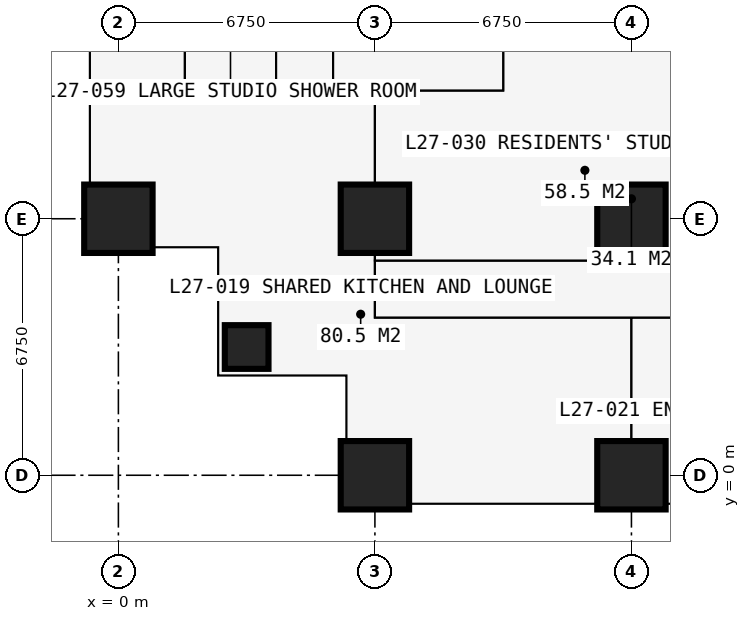
"""IFC4 building model, lengths in metres.
Left out: names, types, materials, properties, quantities, classifications, styles, units other than length and angle.
Written with IfcOpenShell. Run it as: python <this file> out.ifc"""

import sys

from ifc_helpers import new_model, si_unit, direction, frame, frame_2d, origin, origin_2d, place, context, subcontext, project, spatial, rectangle, extrude, element, fill, save


model = new_model("IFC4")
c1 = context("Model", 3, precision=1e-05, world=origin(), true_north=direction((0.0, 1.0)))
c2 = subcontext(c1, "Body", "Model", "MODEL_VIEW")
j1 = project(units=[si_unit("LENGTHUNIT", "METRE"), si_unit("PLANEANGLEUNIT", "RADIAN")], contexts=[c1])
p1 = place(None, origin())
s1 = spatial("IfcSite", under=j1, at=p1, CompositionType="ELEMENT")
p2 = place(p1, origin())
s2 = spatial("IfcBuilding", under=s1, at=p2, CompositionType="ELEMENT")
p3 = place(p2, frame((0.0, 0.0, 101.7)))
s3 = spatial("IfcBuildingStorey", under=s2, at=p3, CompositionType="ELEMENT", Elevation=101.7)
p4 = place(p3, frame((0.0, 6.75, 0.0), z_axis=(0.0, 0.0, 1.0), x_axis=(1.0, 0.0, 0.0)))
e1 = element("IfcColumn", 1, at=p4, inside=s3, PredefinedType="COLUMN", context=c2, shape_type="SweptSolid", body=[
    extrude(rectangle(XDim=1.8, YDim=1.8, at=origin_2d()), origin(), (0.0, 0.0, 1.0), 3.6),
])
p5 = place(p3, frame((3.375, 3.375, 0.0), z_axis=(0.0, 0.0, 1.0), x_axis=(1.0, 0.0, 0.0)))
e2 = element("IfcColumn", 2, at=p5, inside=s3, PredefinedType="COLUMN", context=c2, shape_type="SweptSolid", body=[
    extrude(rectangle(XDim=1.15, YDim=1.15, at=origin_2d()), origin(), (0.0, 0.0, 1.0), 3.6),
])
for number, where, z_axis, x_axis in (
    (3, (6.75, 0.0, 0.0), (0.0, 0.0, 1.0), (1.0, 0.0, 0.0)),
    (4, (6.75, 6.75, 0.0), (0.0, 0.0, 1.0), (1.0, 0.0, 0.0)),
    (5, (13.5, 0.0, 0.0), (0.0, 0.0, 1.0), (1.0, 0.0, 0.0)),
    (6, (13.5, 6.75, 0.0), (0.0, 0.0, 1.0), (1.0, 0.0, 0.0)),
):
    element("IfcColumn", number, at=place(p3, frame(where, z_axis=z_axis, x_axis=x_axis)), inside=s3, PredefinedType="COLUMN", context=c2, shape_type="SweptSolid", body=[
        extrude(rectangle(XDim=1.8, YDim=1.8, at=origin_2d()), origin(), (0.0, 0.0, 1.0), 3.6),
    ])
p6 = place(p3, frame((-0.75, 6.0, 0.0), z_axis=(0.0, 0.0, 1.0), x_axis=(1.0, 0.0, 0.0)))
e7 = element("IfcWall", 7, at=p6, inside=s3, PredefinedType="SOLIDWALL", context=c2, shape_type="SweptSolid", body=[
    extrude(rectangle(XDim=3.375, YDim=0.3, at=frame_2d((1.688, 0.0))), origin(), (0.0, 0.0, 1.0), 3.375),
])
p7 = place(p6, frame((1.833, 0.0, 0.9)))
e8 = element("IfcOpeningElement", 8, at=p7, cuts=e7, PredefinedType="OPENING", context=c2, shape_type="SweptSolid", body=[
    extrude(rectangle(XDim=1.2, YDim=1.8, at=frame_2d((0.6, 0.9))), frame((0.0, 0.16, 0.0), z_axis=(0.0, -1.0, 0.0), x_axis=(1.0, 0.0, 0.0)), (0.0, 0.0, 1.0), 0.32),
])
p8 = place(p3, frame((2.625, 6.0, 0.0), z_axis=(0.0, 0.0, 1.0), x_axis=(0.0, -1.0, 0.0)))
e9 = element("IfcWall", 9, at=p8, inside=s3, PredefinedType="SOLIDWALL", context=c2, shape_type="SweptSolid", body=[
    extrude(rectangle(XDim=3.375, YDim=0.3, at=frame_2d((1.688, 0.0))), origin(), (0.0, 0.0, 1.0), 3.375),
])
p9 = place(p8, frame((0.788, 0.0, 0.6)))
e10 = element("IfcOpeningElement", 10, at=p9, cuts=e9, PredefinedType="OPENING", context=c2, shape_type="SweptSolid", body=[
    extrude(rectangle(XDim=1.8, YDim=2.1, at=frame_2d((0.9, 1.05))), frame((0.0, 0.16, 0.0), z_axis=(0.0, -1.0, 0.0), x_axis=(1.0, 0.0, 0.0)), (0.0, 0.0, 1.0), 0.32),
])
p10 = place(p3, frame((2.625, 2.625, 0.0), z_axis=(0.0, 0.0, 1.0), x_axis=(1.0, 0.0, 0.0)))
e11 = element("IfcWall", 11, at=p10, inside=s3, PredefinedType="SOLIDWALL", context=c2, shape_type="SweptSolid", body=[
    extrude(rectangle(XDim=3.375, YDim=0.3, at=frame_2d((1.688, 0.0))), origin(), (0.0, 0.0, 1.0), 3.375),
])
p11 = place(p10, frame((0.788, 0.0, 0.6)))
e12 = element("IfcOpeningElement", 12, at=p11, cuts=e11, PredefinedType="OPENING", context=c2, shape_type="SweptSolid", body=[
    extrude(rectangle(XDim=1.8, YDim=2.1, at=frame_2d((0.9, 1.05))), frame((0.0, 0.16, 0.0), z_axis=(0.0, -1.0, 0.0), x_axis=(1.0, 0.0, 0.0)), (0.0, 0.0, 1.0), 0.32),
])
p12 = place(p3, frame((6.0, 2.625, 0.0), z_axis=(0.0, 0.0, 1.0), x_axis=(0.0, -1.0, 0.0)))
e13 = element("IfcWall", 13, at=p12, inside=s3, PredefinedType="SOLIDWALL", context=c2, shape_type="SweptSolid", body=[
    extrude(rectangle(XDim=3.375, YDim=0.3, at=frame_2d((1.688, 0.0))), origin(), (0.0, 0.0, 1.0), 3.375),
])
p13 = place(p12, frame((0.343, 0.0, 0.9)))
e14 = element("IfcOpeningElement", 14, at=p13, cuts=e13, PredefinedType="OPENING", context=c2, shape_type="SweptSolid", body=[
    extrude(rectangle(XDim=1.2, YDim=1.8, at=frame_2d((0.6, 0.9))), frame((0.0, 0.16, 0.0), z_axis=(0.0, -1.0, 0.0), x_axis=(1.0, 0.0, 0.0)), (0.0, 0.0, 1.0), 0.32),
])
p14 = place(p3, frame((20.25, -0.75, 0.0), z_axis=(0.0, 0.0, 1.0), x_axis=(-1.0, 0.0, 0.0)))
e15 = element("IfcWall", 15, at=p14, inside=s3, PredefinedType="SOLIDWALL", context=c2, shape_type="SweptSolid", body=[
    extrude(rectangle(XDim=6.75, YDim=0.15, at=frame_2d((3.375, 0.0))), origin(), (0.0, 0.0, 1.0), 3.375),
])
p15 = place(p14, frame((0.962, 0.0, 0.0)))
e16 = element("IfcOpeningElement", 16, at=p15, cuts=e15, PredefinedType="OPENING", context=c2, shape_type="SweptSolid", body=[
    extrude(rectangle(XDim=1.0, YDim=2.2, at=frame_2d((0.5, 1.1))), frame((0.0, 0.085, 0.0), z_axis=(0.0, -1.0, 0.0), x_axis=(1.0, 0.0, 0.0)), (0.0, 0.0, 1.0), 0.17),
])
p16 = place(p14, frame((2.025, 0.0, 0.9)))
e17 = element("IfcOpeningElement", 17, at=p16, cuts=e15, PredefinedType="OPENING", context=c2, shape_type="SweptSolid", body=[
    extrude(rectangle(XDim=1.2, YDim=1.8, at=frame_2d((0.6, 0.9))), frame((0.0, 0.085, 0.0), z_axis=(0.0, -1.0, 0.0), x_axis=(1.0, 0.0, 0.0)), (0.0, 0.0, 1.0), 0.17),
])
p17 = place(p14, frame((4.788, 0.0, 0.0)))
e18 = element("IfcOpeningElement", 18, at=p17, cuts=e15, PredefinedType="OPENING", context=c2, shape_type="SweptSolid", body=[
    extrude(rectangle(XDim=1.0, YDim=2.2, at=frame_2d((0.5, 1.1))), frame((0.0, 0.085, 0.0), z_axis=(0.0, -1.0, 0.0), x_axis=(1.0, 0.0, 0.0)), (0.0, 0.0, 1.0), 0.17),
])
p18 = place(p14, frame((3.525, 0.0, 0.9)))
e19 = element("IfcOpeningElement", 19, at=p18, cuts=e15, PredefinedType="OPENING", context=c2, shape_type="SweptSolid", body=[
    extrude(rectangle(XDim=1.2, YDim=1.8, at=frame_2d((0.6, 0.9))), frame((0.0, 0.085, 0.0), z_axis=(0.0, -1.0, 0.0), x_axis=(1.0, 0.0, 0.0)), (0.0, 0.0, 1.0), 0.17),
])
p19 = place(p3, frame((-0.734, 10.125, 0.0), z_axis=(0.0, 0.0, 1.0), x_axis=(1.0, 0.0, 0.0)))
e20 = element("IfcWall", 20, at=p19, inside=s3, PredefinedType="PARTITIONING", context=c2, shape_type="SweptSolid", body=[
    extrude(rectangle(XDim=10.859, YDim=0.15, at=frame_2d((5.429, 0.0))), origin(), (0.0, 0.0, 1.0), 3.375),
])
p20 = place(p3, frame((1.75, 10.125, 0.0), z_axis=(0.0, 0.0, 1.0), x_axis=(0.0, 1.0, 0.0)))
e21 = element("IfcWall", 21, at=p20, inside=s3, PredefinedType="PARTITIONING", context=c2, shape_type="SweptSolid", body=[
    extrude(rectangle(XDim=2.6, YDim=0.1, at=frame_2d((1.3, 0.0))), origin(), (0.0, 0.0, 1.0), 3.375),
])
p21 = place(p20, frame((0.85, 0.0, 0.0)))
e22 = element("IfcOpeningElement", 22, at=p21, cuts=e21, PredefinedType="OPENING", context=c2, shape_type="SweptSolid", body=[
    extrude(rectangle(XDim=0.9, YDim=2.2, at=frame_2d((0.45, 1.1))), frame((0.0, 0.06, 0.0), z_axis=(0.0, -1.0, 0.0), x_axis=(1.0, 0.0, 0.0)), (0.0, 0.0, 1.0), 0.12),
])
p22 = place(p3, frame((4.15, 10.125, 0.0), z_axis=(0.0, 0.0, 1.0), x_axis=(0.0, 1.0, 0.0)))
e23 = element("IfcWall", 23, at=p22, inside=s3, PredefinedType="PARTITIONING", context=c2, shape_type="SweptSolid", body=[
    extrude(rectangle(XDim=16.875, YDim=0.1, at=frame_2d((8.438, 0.0))), origin(), (0.0, 0.0, 1.0), 3.375),
])
p23 = place(p22, frame((13.7, 0.0, 0.0)))
e24 = element("IfcOpeningElement", 24, at=p23, cuts=e23, PredefinedType="OPENING", context=c2, shape_type="SweptSolid", body=[
    extrude(rectangle(XDim=0.95, YDim=2.2, at=frame_2d((0.475, 1.1))), frame((0.0, 0.06, 0.0), z_axis=(0.0, -1.0, 0.0), x_axis=(1.0, 0.0, 0.0)), (0.0, 0.0, 1.0), 0.12),
])
p24 = place(p22, frame((4.2, 0.0, 0.0)))
e25 = element("IfcOpeningElement", 25, at=p24, cuts=e23, PredefinedType="OPENING", context=c2, shape_type="SweptSolid", body=[
    extrude(rectangle(XDim=0.95, YDim=2.2, at=frame_2d((0.475, 1.1))), frame((0.0, 0.06, 0.0), z_axis=(0.0, -1.0, 0.0), x_axis=(1.0, 0.0, 0.0)), (0.0, 0.0, 1.0), 0.12),
])
p25 = place(p22, frame((10.95, 0.0, 0.0)))
e26 = element("IfcOpeningElement", 26, at=p25, cuts=e23, PredefinedType="OPENING", context=c2, shape_type="SweptSolid", body=[
    extrude(rectangle(XDim=0.95, YDim=2.2, at=frame_2d((0.475, 1.1))), frame((0.0, 0.06, 0.0), z_axis=(0.0, -1.0, 0.0), x_axis=(1.0, 0.0, 0.0)), (0.0, 0.0, 1.0), 0.12),
])
p26 = place(p3, frame((5.65, 10.125, 0.0), z_axis=(0.0, 0.0, 1.0), x_axis=(0.0, 1.0, 0.0)))
e27 = element("IfcWall", 27, at=p26, inside=s3, PredefinedType="PARTITIONING", context=c2, shape_type="SweptSolid", body=[
    extrude(rectangle(XDim=10.762, YDim=0.15, at=frame_2d((5.381, 0.0))), origin(), (0.0, 0.0, 1.0), 3.375),
])
p27 = place(p26, frame((4.9, 0.0, 0.0)))
e28 = element("IfcOpeningElement", 28, at=p27, cuts=e27, PredefinedType="OPENING", context=c2, shape_type="SweptSolid", body=[
    extrude(rectangle(XDim=0.95, YDim=2.2, at=frame_2d((0.475, 1.1))), frame((0.0, 0.085, 0.0), z_axis=(0.0, -1.0, 0.0), x_axis=(1.0, 0.0, 0.0)), (0.0, 0.0, 1.0), 0.17),
])
p28 = place(p3, frame((6.75, 4.15, 0.0), z_axis=(0.0, 0.0, 1.0), x_axis=(0.0, 1.0, 0.0)))
e29 = element("IfcWall", 29, at=p28, inside=s3, PredefinedType="PARTITIONING", context=c2, shape_type="SweptSolid", body=[
    extrude(rectangle(XDim=5.975, YDim=0.15, at=frame_2d((2.988, 0.0))), origin(), (0.0, 0.0, 1.0), 2.877),
])
p29 = place(p3, frame((6.75, 4.15, 0.0), z_axis=(0.0, 0.0, 1.0), x_axis=(1.0, 0.0, 0.0)))
e30 = element("IfcWall", 30, at=p29, inside=s3, PredefinedType="PARTITIONING", context=c2, shape_type="SweptSolid", body=[
    extrude(rectangle(XDim=23.625, YDim=0.1, at=frame_2d((11.812, 0.0))), origin(), (0.0, 0.0, 1.0), 3.375),
])
p30 = place(p29, frame((2.85, 0.0, 0.0)))
e31 = element("IfcOpeningElement", 31, at=p30, cuts=e30, PredefinedType="OPENING", context=c2, shape_type="SweptSolid", body=[
    extrude(rectangle(XDim=1.0, YDim=2.2, at=frame_2d((0.5, 1.1))), frame((0.0, 0.06, 0.0), z_axis=(0.0, -1.0, 0.0), x_axis=(1.0, 0.0, 0.0)), (0.0, 0.0, 1.0), 0.12),
])
p31 = place(p29, frame((6.95, 0.0, 0.0)))
e32 = element("IfcOpeningElement", 32, at=p31, cuts=e30, PredefinedType="OPENING", context=c2, shape_type="SweptSolid", body=[
    extrude(rectangle(XDim=0.95, YDim=2.2, at=frame_2d((0.475, 1.1))), frame((0.0, 0.06, 0.0), z_axis=(0.0, -1.0, 0.0), x_axis=(1.0, 0.0, 0.0)), (0.0, 0.0, 1.0), 0.12),
])
p32 = place(p29, frame((10.375, 0.0, 0.0)))
e33 = element("IfcOpeningElement", 33, at=p32, cuts=e30, PredefinedType="OPENING", context=c2, shape_type="SweptSolid", body=[
    extrude(rectangle(XDim=0.95, YDim=2.2, at=frame_2d((0.475, 1.1))), frame((0.0, 0.06, 0.0), z_axis=(0.0, -1.0, 0.0), x_axis=(1.0, 0.0, 0.0)), (0.0, 0.0, 1.0), 0.12),
])
p33 = place(p29, frame((18.475, 0.0, 0.0)))
e34 = element("IfcOpeningElement", 34, at=p33, cuts=e30, PredefinedType="OPENING", context=c2, shape_type="SweptSolid", body=[
    extrude(rectangle(XDim=0.95, YDim=2.2, at=frame_2d((0.475, 1.1))), frame((0.0, 0.06, 0.0), z_axis=(0.0, -1.0, 0.0), x_axis=(1.0, 0.0, 0.0)), (0.0, 0.0, 1.0), 0.12),
])
p34 = place(p29, frame((13.7, 0.0, 0.0)))
e35 = element("IfcOpeningElement", 35, at=p34, cuts=e30, PredefinedType="OPENING", context=c2, shape_type="SweptSolid", body=[
    extrude(rectangle(XDim=0.95, YDim=2.2, at=frame_2d((0.475, 1.1))), frame((0.0, 0.06, 0.0), z_axis=(0.0, -1.0, 0.0), x_axis=(1.0, 0.0, 0.0)), (0.0, 0.0, 1.0), 0.12),
])
p35 = place(p3, frame((6.75, 5.65, 0.0), z_axis=(0.0, 0.0, 1.0), x_axis=(1.0, 0.0, 0.0)))
e36 = element("IfcWall", 36, at=p35, inside=s3, PredefinedType="PARTITIONING", context=c2, shape_type="SweptSolid", body=[
    extrude(rectangle(XDim=11.05, YDim=0.15, at=frame_2d((5.525, 0.0))), origin(), (0.0, 0.0, 1.0), 3.375),
])
p36 = place(p3, frame((10.125, 10.125, 0.0), z_axis=(0.0, 0.0, 1.0), x_axis=(0.0, 1.0, 0.0)))
e37 = element("IfcWall", 37, at=p36, inside=s3, PredefinedType="PARTITIONING", context=c2, shape_type="SweptSolid", body=[
    extrude(rectangle(XDim=1.175, YDim=0.15, at=frame_2d((0.587, 0.0))), origin(), (0.0, 0.0, 1.0), 3.375),
])
p37 = place(p3, frame((13.5, -0.734, 0.0), z_axis=(0.0, 0.0, 1.0), x_axis=(0.0, 1.0, 0.0)))
e38 = element("IfcWall", 38, at=p37, inside=s3, PredefinedType="PARTITIONING", context=c2, shape_type="SweptSolid", body=[
    extrude(rectangle(XDim=4.884, YDim=0.15, at=frame_2d((2.442, 0.0))), origin(), (0.0, 0.0, 1.0), 2.877),
])
p38 = place(p7, origin())
e39 = element("IfcWindow", 39, at=p38, inside=s3, PartitioningType="SINGLE_PANEL", PredefinedType="WINDOW", context=c2, shape_type="SweptSolid", body=[
    extrude(rectangle(XDim=1.2, YDim=1.8, at=frame_2d((0.6, 0.9))), frame((0.0, 0.03, 0.0), z_axis=(0.0, -1.0, 0.0), x_axis=(1.0, 0.0, 0.0)), (0.0, 0.0, 1.0), 0.06),
])
fill(e8, e39)
p39 = place(p9, origin())
e40 = element("IfcWindow", 40, at=p39, inside=s3, PartitioningType="SINGLE_PANEL", PredefinedType="WINDOW", context=c2, shape_type="SweptSolid", body=[
    extrude(rectangle(XDim=1.8, YDim=2.1, at=frame_2d((0.9, 1.05))), frame((0.0, 0.03, 0.0), z_axis=(0.0, -1.0, 0.0), x_axis=(1.0, 0.0, 0.0)), (0.0, 0.0, 1.0), 0.06),
])
fill(e10, e40)
p40 = place(p11, origin())
e41 = element("IfcWindow", 41, at=p40, inside=s3, PartitioningType="SINGLE_PANEL", PredefinedType="WINDOW", context=c2, shape_type="SweptSolid", body=[
    extrude(rectangle(XDim=1.8, YDim=2.1, at=frame_2d((0.9, 1.05))), frame((0.0, 0.03, 0.0), z_axis=(0.0, -1.0, 0.0), x_axis=(1.0, 0.0, 0.0)), (0.0, 0.0, 1.0), 0.06),
])
fill(e12, e41)
p41 = place(p13, origin())
e42 = element("IfcWindow", 42, at=p41, inside=s3, PartitioningType="SINGLE_PANEL", PredefinedType="WINDOW", context=c2, shape_type="SweptSolid", body=[
    extrude(rectangle(XDim=1.2, YDim=1.8, at=frame_2d((0.6, 0.9))), frame((0.0, 0.03, 0.0), z_axis=(0.0, -1.0, 0.0), x_axis=(1.0, 0.0, 0.0)), (0.0, 0.0, 1.0), 0.06),
])
fill(e14, e42)
p42 = place(p17, origin())
e43 = element("IfcDoor", 43, at=p42, inside=s3, OperationType="SINGLE_SWING_RIGHT", PredefinedType="DOOR", context=c2, shape_type="SweptSolid", body=[
    extrude(rectangle(XDim=1.0, YDim=2.2, at=frame_2d((0.5, 1.1))), frame((0.0, 0.025, 0.0), z_axis=(0.0, -1.0, 0.0), x_axis=(1.0, 0.0, 0.0)), (0.0, 0.0, 1.0), 0.05),
])
fill(e18, e43)
p43 = place(p30, origin())
e44 = element("IfcDoor", 44, at=p43, inside=s3, OperationType="SINGLE_SWING_LEFT", PredefinedType="DOOR", context=c2, shape_type="SweptSolid", body=[
    extrude(rectangle(XDim=1.0, YDim=2.2, at=frame_2d((0.5, 1.1))), frame((0.0, 0.025, 0.0), z_axis=(0.0, -1.0, 0.0), x_axis=(1.0, 0.0, 0.0)), (0.0, 0.0, 1.0), 0.05),
])
fill(e31, e44)
p44 = place(p31, origin())
e45 = element("IfcDoor", 45, at=p44, inside=s3, OperationType="SINGLE_SWING_LEFT", PredefinedType="DOOR", context=c2, shape_type="SweptSolid", body=[
    extrude(rectangle(XDim=0.95, YDim=2.2, at=frame_2d((0.475, 1.1))), frame((0.0, 0.025, 0.0), z_axis=(0.0, -1.0, 0.0), x_axis=(1.0, 0.0, 0.0)), (0.0, 0.0, 1.0), 0.05),
])
fill(e32, e45)
p45 = place(p21, origin())
e46 = element("IfcDoor", 46, at=p45, inside=s3, OperationType="SINGLE_SWING_RIGHT", PredefinedType="DOOR", context=c2, shape_type="SweptSolid", body=[
    extrude(rectangle(XDim=0.9, YDim=2.2, at=frame_2d((0.45, 1.1))), frame((0.0, 0.025, 0.0), z_axis=(0.0, -1.0, 0.0), x_axis=(1.0, 0.0, 0.0)), (0.0, 0.0, 1.0), 0.05),
])
fill(e22, e46)
save(model, sys.argv[1])
